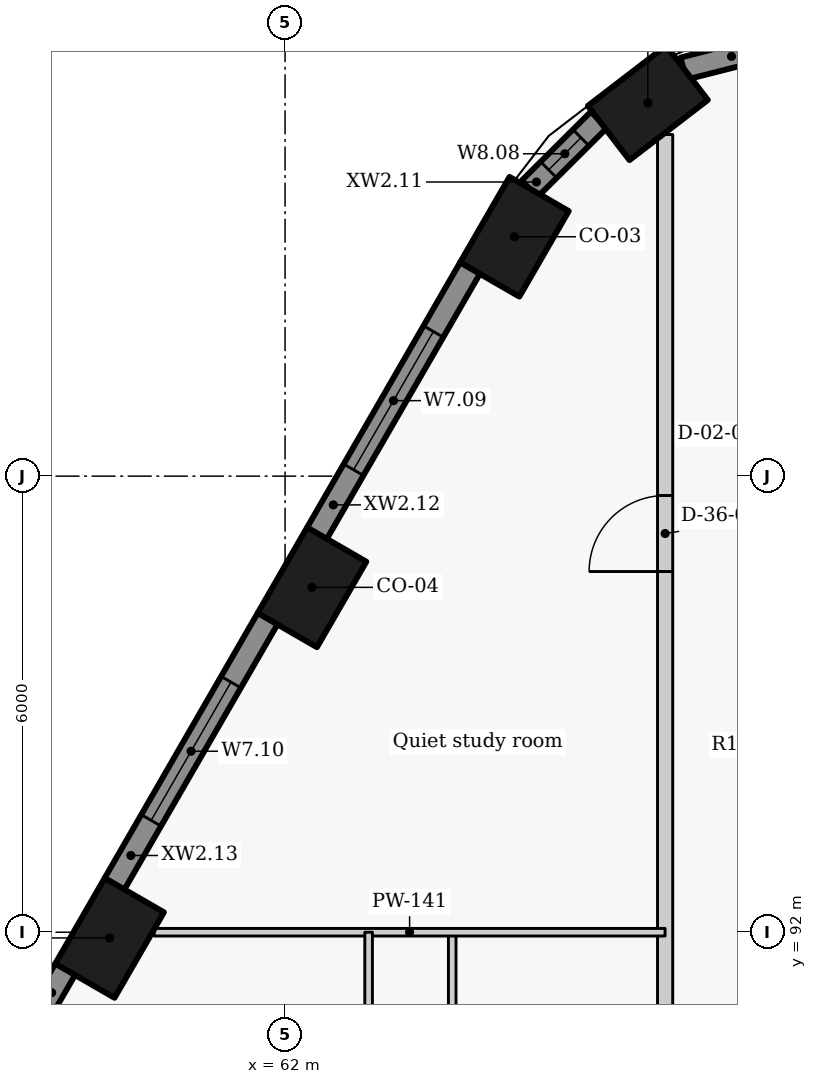
"""IFC4 building model, lengths in metres.
Left out: names, types, materials, properties, quantities, classifications, styles, units other than length and angle.
Written with IfcOpenShell. Run it as: python <this file> out.ifc"""

import sys

from ifc_helpers import new_model, si_unit, direction, frame, frame_2d, origin, origin_2d, place, context, subcontext, project, spatial, rectangle, extrude, element, fill, save


model = new_model("IFC4")
c1 = context("Model", 3, precision=1e-05, world=origin(), true_north=direction((0.0, 1.0)))
c2 = subcontext(c1, "Body", "Model", "MODEL_VIEW")
j1 = project(units=[si_unit("LENGTHUNIT", "METRE"), si_unit("PLANEANGLEUNIT", "RADIAN")], contexts=[c1])
p1 = place(None, origin())
s1 = spatial("IfcSite", under=j1, at=p1, CompositionType="ELEMENT")
p2 = place(p1, origin())
s2 = spatial("IfcBuilding", under=s1, at=p2, CompositionType="ELEMENT")
p3 = place(p2, frame((0.0, 0.0, 166.8)))
s3 = spatial("IfcBuildingStorey", under=s2, at=p3, CompositionType="ELEMENT", Elevation=166.8)
for number, where, z_axis, x_axis in (
    (1, (66.773, 102.91, 0.0), (0.0, 0.0, 1.0), (-0.793, -0.609, 0.0)),
    (2, (65.018, 101.149, 0.0), (0.0, 0.0, 1.0), (-0.5, -0.866, 0.0)),
    (3, (62.354, 96.537, 0.0), (0.0, 0.0, 1.0), (-0.5, -0.866, 0.0)),
    (4, (59.692, 91.925, 0.0), (0.0, 0.0, 1.0), (-0.5, -0.866, 0.0)),
):
    element("IfcColumn", number, at=place(p3, frame(where, z_axis=z_axis, x_axis=x_axis)), inside=s3, PredefinedType="COLUMN", context=c2, shape_type="SweptSolid", body=[
        extrude(rectangle(XDim=1.3, YDim=0.9, at=origin_2d()), origin(), (0.0, 0.0, 1.0), 3.3),
    ])
p4 = place(p3, frame((68.506, 103.683, 0.0), z_axis=(0.0, 0.0, 1.0), x_axis=(-0.96924493129, -0.246098076322, 0.0)))
e5 = element("IfcWall", 5, at=p4, inside=s3, PredefinedType="SOLIDWALL", context=c2, shape_type="SweptSolid", body=[
    extrude(rectangle(XDim=1.305, YDim=0.3, at=frame_2d((0.653, 0.0))), origin(), (0.0, 0.0, 1.0), 2.05),
])
p5 = place(p3, frame((66.129, 102.688, 0.0), z_axis=(0.0, 0.0, 1.0), x_axis=(-0.70881270082, -0.705396735997, 0.0)))
e6 = element("IfcWall", 6, at=p5, inside=s3, PredefinedType="SOLIDWALL", context=c2, shape_type="SweptSolid", body=[
    extrude(rectangle(XDim=1.286, YDim=0.3, at=frame_2d((0.643, 0.0))), origin(), (0.0, 0.0, 1.0), 2.05),
])
p6 = place(p5, frame((0.333, 0.0, 0.9)))
e7 = element("IfcOpeningElement", 7, at=p6, cuts=e6, PredefinedType="OPENING", context=c2, shape_type="SweptSolid", body=[
    extrude(rectangle(XDim=0.6, YDim=1.1, at=frame_2d((0.3, 0.55))), frame((0.0, 0.16, 0.0), z_axis=(0.0, -1.0, 0.0), x_axis=(1.0, 0.0, 0.0)), (0.0, 0.0, 1.0), 0.32),
])
p7 = place(p3, frame((64.435, 100.74, 0.0), z_axis=(0.0, 0.0, 1.0), x_axis=(-0.500031546601, -0.86600718958, 0.0)))
e8 = element("IfcWall", 8, at=p7, inside=s3, PredefinedType="SOLIDWALL", context=c2, shape_type="SweptSolid", body=[
    extrude(rectangle(XDim=4.034, YDim=0.3, at=frame_2d((2.017, 0.0))), origin(), (0.0, 0.0, 1.0), 2.05),
])
p8 = place(p7, frame((0.967, 0.0, 0.9)))
e9 = element("IfcOpeningElement", 9, at=p8, cuts=e8, PredefinedType="OPENING", context=c2, shape_type="SweptSolid", body=[
    extrude(rectangle(XDim=2.1, YDim=1.1, at=frame_2d((1.05, 0.55))), frame((0.0, 0.16, 0.0), z_axis=(0.0, -1.0, 0.0), x_axis=(1.0, 0.0, 0.0)), (0.0, 0.0, 1.0), 0.32),
])
p9 = place(p3, frame((61.772, 96.128, 0.0), z_axis=(0.0, 0.0, 1.0), x_axis=(-0.500031546601, -0.86600718958, 0.0)))
e10 = element("IfcWall", 10, at=p9, inside=s3, PredefinedType="SOLIDWALL", context=c2, shape_type="SweptSolid", body=[
    extrude(rectangle(XDim=4.034, YDim=0.3, at=frame_2d((2.017, 0.0))), origin(), (0.0, 0.0, 1.0), 2.05),
])
p10 = place(p9, frame((0.967, 0.0, 0.9)))
e11 = element("IfcOpeningElement", 11, at=p10, cuts=e10, PredefinedType="OPENING", context=c2, shape_type="SweptSolid", body=[
    extrude(rectangle(XDim=2.1, YDim=1.1, at=frame_2d((1.05, 0.55))), frame((0.0, 0.16, 0.0), z_axis=(0.0, -1.0, 0.0), x_axis=(1.0, 0.0, 0.0)), (0.0, 0.0, 1.0), 0.32),
])
p11 = place(p3, frame((59.109, 91.515, 0.0), z_axis=(0.0, 0.0, 1.0), x_axis=(-0.499933594891, -0.866063739398, 0.0)))
e12 = element("IfcWall", 12, at=p11, inside=s3, PredefinedType="SOLIDWALL", context=c2, shape_type="SweptSolid", body=[
    extrude(rectangle(XDim=3.737, YDim=0.3, at=frame_2d((1.868, 0.0))), origin(), (0.0, 0.0, 1.0), 2.05),
])
p12 = place(p11, frame((0.818, 0.0, 0.9)))
e13 = element("IfcOpeningElement", 13, at=p12, cuts=e12, PredefinedType="OPENING", context=c2, shape_type="SweptSolid", body=[
    extrude(rectangle(XDim=2.1, YDim=1.1, at=frame_2d((1.05, 0.55))), frame((0.0, 0.16, 0.0), z_axis=(0.0, -1.0, 0.0), x_axis=(1.0, 0.0, 0.0)), (0.0, 0.0, 1.0), 0.32),
])
p13 = place(p3, frame((67.0, 56.833, 0.0), z_axis=(0.0, 0.0, 1.0), x_axis=(0.0, 1.0, 0.0)))
e14 = element("IfcWall", 14, at=p13, inside=s3, PredefinedType="PARTITIONING", context=c2, shape_type="SweptSolid", body=[
    extrude(rectangle(XDim=45.661, YDim=0.2, at=frame_2d((22.831, 0.0))), origin(), (0.0, 0.0, 1.0), 2.03),
])
p14 = place(p13, frame((7.084, 0.0, 0.0)))
e15 = element("IfcOpeningElement", 15, at=p14, cuts=e14, PredefinedType="OPENING", context=c2, shape_type="SweptSolid", body=[
    extrude(rectangle(XDim=1.0, YDim=2.01, at=frame_2d((0.5, 1.005))), frame((0.0, 0.11, 0.0), z_axis=(0.0, -1.0, 0.0), x_axis=(1.0, 0.0, 0.0)), (0.0, 0.0, 1.0), 0.22),
])
p15 = place(p13, frame((15.442, 0.0, 0.0)))
e16 = element("IfcOpeningElement", 16, at=p15, cuts=e14, PredefinedType="OPENING", context=c2, shape_type="SweptSolid", body=[
    extrude(rectangle(XDim=1.0, YDim=2.01, at=frame_2d((0.5, 1.005))), frame((0.0, 0.11, 0.0), z_axis=(0.0, -1.0, 0.0), x_axis=(1.0, 0.0, 0.0)), (0.0, 0.0, 1.0), 0.22),
])
p16 = place(p13, frame((26.567, 0.0, 0.0)))
e17 = element("IfcOpeningElement", 17, at=p16, cuts=e14, PredefinedType="OPENING", context=c2, shape_type="SweptSolid", body=[
    extrude(rectangle(XDim=1.0, YDim=2.01, at=frame_2d((0.5, 1.005))), frame((0.0, 0.11, 0.0), z_axis=(0.0, -1.0, 0.0), x_axis=(1.0, 0.0, 0.0)), (0.0, 0.0, 1.0), 0.22),
])
p17 = place(p13, frame((39.912, 0.0, 0.0)))
e18 = element("IfcOpeningElement", 18, at=p17, cuts=e14, PredefinedType="OPENING", context=c2, shape_type="SweptSolid", body=[
    extrude(rectangle(XDim=1.0, YDim=2.01, at=frame_2d((0.5, 1.005))), frame((0.0, 0.11, 0.0), z_axis=(0.0, -1.0, 0.0), x_axis=(1.0, 0.0, 0.0)), (0.0, 0.0, 1.0), 0.22),
])
p18 = place(p3, frame((64.199, 92.0, 0.0), z_axis=(0.0, 0.0, 1.0), x_axis=(0.0, -1.0, 0.0)))
e19 = element("IfcWall", 19, at=p18, inside=s3, PredefinedType="PARTITIONING", context=c2, shape_type="SweptSolid", body=[
    extrude(rectangle(XDim=7.3, YDim=0.1, at=frame_2d((3.65, 0.0))), origin(), (0.0, 0.0, 1.0), 2.95),
])
p19 = place(p18, frame((5.216, 0.0, 0.0)))
e20 = element("IfcOpeningElement", 20, at=p19, cuts=e19, PredefinedType="OPENING", context=c2, shape_type="SweptSolid", body=[
    extrude(rectangle(XDim=0.85, YDim=2.1, at=frame_2d((0.425, 1.05))), frame((0.0, 0.06, 0.0), z_axis=(0.0, -1.0, 0.0), x_axis=(1.0, 0.0, 0.0)), (0.0, 0.0, 1.0), 0.12),
])
p20 = place(p18, frame((1.541, 0.0, 0.0)))
e21 = element("IfcOpeningElement", 21, at=p20, cuts=e19, PredefinedType="OPENING", context=c2, shape_type="SweptSolid", body=[
    extrude(rectangle(XDim=0.9, YDim=2.1, at=frame_2d((0.45, 1.05))), frame((0.0, 0.06, 0.0), z_axis=(0.0, -1.0, 0.0), x_axis=(1.0, 0.0, 0.0)), (0.0, 0.0, 1.0), 0.12),
])
p21 = place(p3, frame((60.278, 92.0, 0.0), z_axis=(0.0, 0.0, 1.0), x_axis=(1.0, 0.0, 0.0)))
e22 = element("IfcWall", 22, at=p21, inside=s3, PredefinedType="PARTITIONING", context=c2, shape_type="SweptSolid", body=[
    extrude(rectangle(XDim=6.721, YDim=0.1, at=frame_2d((3.361, 0.0))), origin(), (0.0, 0.0, 1.0), 2.95),
])
p22 = place(p3, frame((63.099, 83.1, 0.0), z_axis=(0.0, 0.0, 1.0), x_axis=(0.0, 1.0, 0.0)))
e23 = element("IfcWall", 23, at=p22, inside=s3, PredefinedType="PARTITIONING", context=c2, shape_type="SweptSolid", body=[
    extrude(rectangle(XDim=8.9, YDim=0.1, at=frame_2d((4.45, 0.0))), origin(), (0.0, 0.0, 1.0), 2.95),
])
p23 = place(p22, frame((4.0, 0.0, 0.0)))
e24 = element("IfcOpeningElement", 24, at=p23, cuts=e23, PredefinedType="OPENING", context=c2, shape_type="SweptSolid", body=[
    extrude(rectangle(XDim=0.9, YDim=2.1, at=frame_2d((0.45, 1.05))), frame((0.0, 0.06, 0.0), z_axis=(0.0, -1.0, 0.0), x_axis=(1.0, 0.0, 0.0)), (0.0, 0.0, 1.0), 0.12),
])
p24 = place(p6, origin())
e25 = element("IfcWindow", 25, at=p24, inside=s3, PartitioningType="SINGLE_PANEL", PredefinedType="WINDOW", context=c2, shape_type="SweptSolid", body=[
    extrude(rectangle(XDim=0.6, YDim=1.1, at=frame_2d((0.3, 0.55))), frame((0.0, 0.03, 0.0), z_axis=(0.0, -1.0, 0.0), x_axis=(1.0, 0.0, 0.0)), (0.0, 0.0, 1.0), 0.06),
])
fill(e7, e25)
p25 = place(p8, origin())
e26 = element("IfcWindow", 26, at=p25, inside=s3, PartitioningType="SINGLE_PANEL", PredefinedType="WINDOW", context=c2, shape_type="SweptSolid", body=[
    extrude(rectangle(XDim=2.1, YDim=1.1, at=frame_2d((1.05, 0.55))), frame((0.0, 0.03, 0.0), z_axis=(0.0, -1.0, 0.0), x_axis=(1.0, 0.0, 0.0)), (0.0, 0.0, 1.0), 0.06),
])
fill(e9, e26)
p26 = place(p10, origin())
e27 = element("IfcWindow", 27, at=p26, inside=s3, PartitioningType="SINGLE_PANEL", PredefinedType="WINDOW", context=c2, shape_type="SweptSolid", body=[
    extrude(rectangle(XDim=2.1, YDim=1.1, at=frame_2d((1.05, 0.55))), frame((0.0, 0.03, 0.0), z_axis=(0.0, -1.0, 0.0), x_axis=(1.0, 0.0, 0.0)), (0.0, 0.0, 1.0), 0.06),
])
fill(e11, e27)
p27 = place(p17, origin())
e28 = element("IfcDoor", 28, at=p27, inside=s3, OperationType="SINGLE_SWING_LEFT", PredefinedType="DOOR", context=c2, shape_type="SweptSolid", body=[
    extrude(rectangle(XDim=1.0, YDim=2.01, at=frame_2d((0.5, 1.005))), frame((0.0, 0.025, 0.0), z_axis=(0.0, -1.0, 0.0), x_axis=(1.0, 0.0, 0.0)), (0.0, 0.0, 1.0), 0.05),
])
fill(e18, e28)
save(model, sys.argv[1])
